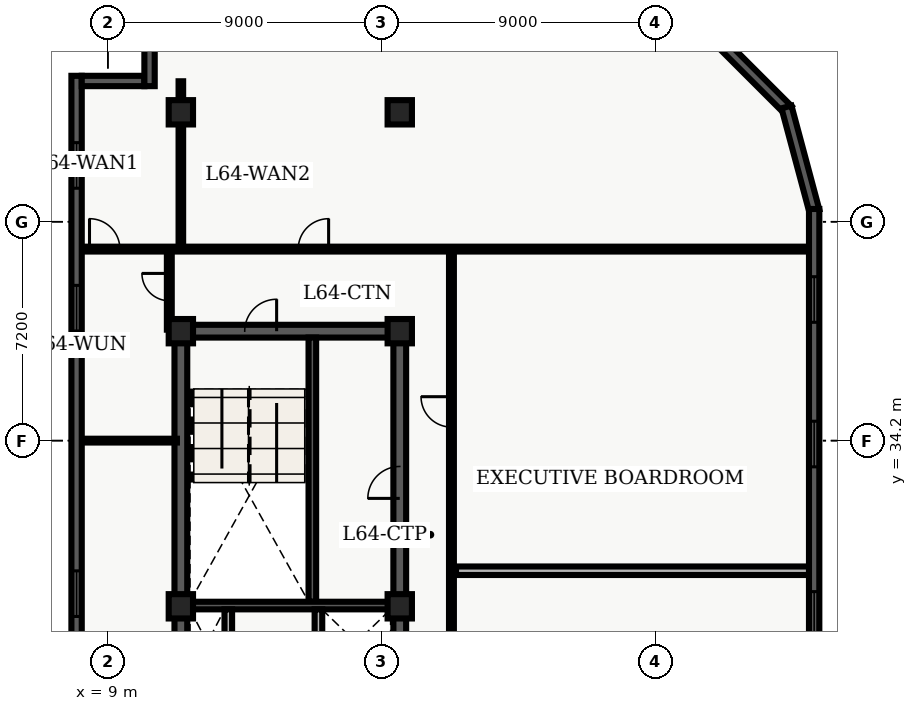
"""IFC4 building model, lengths in metres.
Left out: names, types, materials, properties, quantities, classifications, styles, units other than length and angle.
Written with IfcOpenShell. Run it as: python <this file> out.ifc"""

import sys

from ifc_helpers import new_model, entity, si_unit, converted_unit, direction, frame, origin_with_axes, origin_2d_with_axis, place, context, subcontext, project, spatial, polyline, rectangle, outline, extrude, element, fill, save


model = new_model("IFC4")
c1 = context("Model", 3, precision=1e-05, world=origin_with_axes(), true_north=direction((0.0, 1.0)))
c2 = subcontext(c1, "Body", "Model", "MODEL_VIEW")
j1 = project(units=[si_unit("LENGTHUNIT", "METRE"), converted_unit("PLANEANGLEUNIT", "DEGREE", entity("IfcPlaneAngleMeasure", 0.017), si_unit("PLANEANGLEUNIT", "RADIAN"), dimensions=[0, 0, 0, 0, 0, 0, 0])], contexts=[c1])
p1 = place(None, origin_with_axes())
s1 = spatial("IfcSite", under=j1, at=p1, CompositionType="ELEMENT")
p2 = place(p1, origin_with_axes())
s2 = spatial("IfcBuilding", under=s1, at=p2, CompositionType="ELEMENT")
p3 = place(p2, frame((0.0, 0.0, 260.7), z_axis=(0.0, 0.0, 1.0), x_axis=(1.0, 0.0, 0.0)))
s3 = spatial("IfcBuildingStorey", under=s2, at=p3, CompositionType="ELEMENT", Elevation=260.7)
p4 = place(p3, frame((11.4, 10.8, 0.0), z_axis=(0.0, 0.0, 1.0), x_axis=(0.0, 1.0, 0.0)))
e1 = element("IfcWall", 1, at=p4, inside=s3, PredefinedType="SHEAR", context=c2, shape_type="SweptSolid", body=[
    extrude(outline(polyline([(0.0, -0.21), (27.0, -0.21), (27.0, 0.21), (0.0, 0.21), (0.0, -0.21)])), origin_with_axes(), (0.0, 0.0, 1.0), 3.66),
])
p5 = place(p3, frame((11.4, 37.8, 0.0), z_axis=(0.0, 0.0, 1.0), x_axis=(1.0, 0.0, 0.0)))
e2 = element("IfcWall", 2, at=p5, inside=s3, PredefinedType="SHEAR", context=c2, shape_type="SweptSolid", body=[
    extrude(outline(polyline([(0.0, -0.21), (7.2, -0.21), (7.2, 0.21), (0.0, 0.21), (0.0, -0.21)])), origin_with_axes(), (0.0, 0.0, 1.0), 3.66),
])
p6 = place(p5, frame((2.625, 0.0, 0.0), z_axis=(0.0, 0.0, 1.0), x_axis=(1.0, 0.0, 0.0)))
e3 = element("IfcOpeningElement", 3, at=p6, cuts=e2, PredefinedType="OPENING", context=c2, shape_type="SweptSolid", body=[
    extrude(rectangle(XDim=1.05, YDim=0.44, at=origin_2d_with_axis()), origin_with_axes(), (0.0, 0.0, 1.0), 2.15),
])
p7 = place(p3, frame((18.6, 24.3, 0.0), z_axis=(0.0, 0.0, 1.0), x_axis=(0.0, 1.0, 0.0)))
e4 = element("IfcWall", 4, at=p7, inside=s3, PredefinedType="SHEAR", context=c2, shape_type="SweptSolid", body=[
    extrude(outline(polyline([(0.0, -0.21), (13.5, -0.21), (13.5, 0.21), (0.0, 0.21), (0.0, -0.21)])), origin_with_axes(), (0.0, 0.0, 1.0), 3.66),
])
p8 = place(p7, frame((8.525, 0.0, 0.0), z_axis=(0.0, 0.0, 1.0), x_axis=(1.0, 0.0, 0.0)))
e5 = element("IfcOpeningElement", 5, at=p8, cuts=e4, PredefinedType="OPENING", context=c2, shape_type="SweptSolid", body=[
    extrude(rectangle(XDim=1.05, YDim=0.44, at=origin_2d_with_axis()), origin_with_axes(), (0.0, 0.0, 1.0), 2.15),
])
p9 = place(p3, frame((15.725, 28.9, 0.0), z_axis=(0.0, 0.0, 1.0), x_axis=(0.0, 1.0, 0.0)))
e6 = element("IfcWall", 6, at=p9, inside=s3, PredefinedType="SHEAR", context=c2, shape_type="SweptSolid", body=[
    extrude(outline(polyline([(0.0, -0.125), (8.69, -0.125), (8.69, 0.125), (0.0, 0.125), (0.0, -0.125)])), origin_with_axes(), (0.0, 0.0, 1.0), 3.66),
])
p10 = place(p3, frame((11.61, 28.775, 0.0), z_axis=(0.0, 0.0, 1.0), x_axis=(1.0, 0.0, 0.0)))
e7 = element("IfcWall", 7, at=p10, inside=s3, PredefinedType="SHEAR", context=c2, shape_type="SweptSolid", body=[
    extrude(outline(polyline([(0.0, -0.125), (6.78, -0.125), (6.78, 0.125), (0.0, 0.125), (0.0, -0.125)])), origin_with_axes(), (0.0, 0.0, 1.0), 3.66),
])
for number, where, z_axis, x_axis in (
    (8, (12.96, 26.45, 0.0), (0.0, 0.0, 1.0), (0.0, 1.0, 0.0)),
    (9, (15.925, 26.45, 0.0), (0.0, 0.0, 1.0), (0.0, 1.0, 0.0)),
):
    element("IfcWall", number, at=place(p3, frame(where, z_axis=z_axis, x_axis=x_axis)), inside=s3, PredefinedType="SOLIDWALL", context=c2, shape_type="SweptSolid", body=[
        extrude(outline(polyline([(0.0, -0.125), (2.2, -0.125), (2.2, 0.125), (0.0, 0.125), (0.0, -0.125)])), origin_with_axes(), (0.0, 0.0, 1.0), 2.7),
    ])
for number, where, z_axis, x_axis in (
    (10, (11.4, 28.75, 0.0), (0.0, 0.0, 1.0), (1.0, 0.0, 0.0)),
    (11, (11.4, 37.8, 0.0), (0.0, 0.0, 1.0), (1.0, 0.0, 0.0)),
    (12, (11.4, 45.0, 0.0), (0.0, 0.0, 1.0), (1.0, 0.0, 0.0)),
    (13, (18.6, 28.75, 0.0), (0.0, 0.0, 1.0), (1.0, 0.0, 0.0)),
    (14, (18.6, 37.8, 0.0), (0.0, 0.0, 1.0), (1.0, 0.0, 0.0)),
    (15, (18.6, 45.0, 0.0), (0.0, 0.0, 1.0), (1.0, 0.0, 0.0)),
):
    element("IfcColumn", number, at=place(p3, frame(where, z_axis=z_axis, x_axis=x_axis)), inside=s3, PredefinedType="COLUMN", context=c2, shape_type="SweptSolid", body=[
        extrude(rectangle(XDim=0.8, YDim=0.8, at=origin_2d_with_axis()), origin_with_axes(), (0.0, 0.0, 1.0), 3.9),
    ])
p11 = place(p3, frame((8.135, 40.5, 0.0), z_axis=(0.0, 0.0, 1.0), x_axis=(1.0, 0.0, 0.0)))
e16 = element("IfcWall", 16, at=p11, inside=s3, PredefinedType="PARTITIONING", context=c2, shape_type="SweptSolid", body=[
    extrude(outline(polyline([(0.0, -0.08), (23.93, -0.08), (23.93, 0.08), (0.0, 0.08), (0.0, -0.08)])), origin_with_axes(), (0.0, 0.0, 1.0), 2.7),
])
p12 = place(p11, frame((0.76, 0.0, 0.0), z_axis=(0.0, 0.0, 1.0), x_axis=(1.0, 0.0, 0.0)))
e17 = element("IfcOpeningElement", 17, at=p12, cuts=e16, PredefinedType="OPENING", context=c2, shape_type="SweptSolid", body=[
    extrude(rectangle(XDim=1.0, YDim=0.18, at=origin_2d_with_axis()), origin_with_axes(), (0.0, 0.0, 1.0), 2.15),
])
p13 = place(p11, frame((7.625, 0.0, 0.0), z_axis=(0.0, 0.0, 1.0), x_axis=(1.0, 0.0, 0.0)))
e18 = element("IfcOpeningElement", 18, at=p13, cuts=e16, PredefinedType="OPENING", context=c2, shape_type="SweptSolid", body=[
    extrude(rectangle(XDim=1.0, YDim=0.18, at=origin_2d_with_axis()), origin_with_axes(), (0.0, 0.0, 1.0), 2.15),
])
p14 = place(p3, frame((20.3, 7.8, 0.0), z_axis=(0.0, 0.0, 1.0), x_axis=(0.0, 1.0, 0.0)))
e19 = element("IfcWall", 19, at=p14, inside=s3, PredefinedType="PARTITIONING", context=c2, shape_type="SweptSolid", body=[
    extrude(outline(polyline([(0.0, -0.08), (32.7, -0.08), (32.7, 0.08), (0.0, 0.08), (0.0, -0.08)])), origin_with_axes(), (0.0, 0.0, 1.0), 2.7),
])
p15 = place(p14, frame((17.825, 0.0, 0.0), z_axis=(0.0, 0.0, 1.0), x_axis=(1.0, 0.0, 0.0)))
e20 = element("IfcOpeningElement", 20, at=p15, cuts=e19, PredefinedType="OPENING", context=c2, shape_type="SweptSolid", body=[
    extrude(rectangle(XDim=1.0, YDim=0.18, at=origin_2d_with_axis()), origin_with_axes(), (0.0, 0.0, 1.0), 2.15),
])
p16 = place(p14, frame((27.345, 0.0, 0.0), z_axis=(0.0, 0.0, 1.0), x_axis=(1.0, 0.0, 0.0)))
e21 = element("IfcOpeningElement", 21, at=p16, cuts=e19, PredefinedType="OPENING", context=c2, shape_type="SweptSolid", body=[
    extrude(rectangle(XDim=1.0, YDim=0.18, at=origin_2d_with_axis()), origin_with_axes(), (0.0, 0.0, 1.0), 2.15),
])
p17 = place(p14, frame((5.775, 0.0, 0.0), z_axis=(0.0, 0.0, 1.0), x_axis=(1.0, 0.0, 0.0)))
e22 = element("IfcOpeningElement", 22, at=p17, cuts=e19, PredefinedType="OPENING", context=c2, shape_type="SweptSolid", body=[
    extrude(rectangle(XDim=1.05, YDim=0.18, at=origin_2d_with_axis()), origin_with_axes(), (0.0, 0.0, 1.0), 2.15),
])
p18 = place(p3, frame((11.02, 37.85, 0.0), z_axis=(0.0, 0.0, 1.0), x_axis=(0.0, 1.0, 0.0)))
e23 = element("IfcWall", 23, at=p18, inside=s3, PredefinedType="PARTITIONING", context=c2, shape_type="SweptSolid", body=[
    extrude(outline(polyline([(0.0, -0.08), (2.65, -0.08), (2.65, 0.08), (0.0, 0.08), (0.0, -0.08)])), origin_with_axes(), (0.0, 0.0, 1.0), 2.7),
])
p19 = place(p18, frame((1.4, 0.0, 0.0), z_axis=(0.0, 0.0, 1.0), x_axis=(1.0, 0.0, 0.0)))
e24 = element("IfcOpeningElement", 24, at=p19, cuts=e23, PredefinedType="OPENING", context=c2, shape_type="SweptSolid", body=[
    extrude(rectangle(XDim=0.9, YDim=0.18, at=origin_2d_with_axis()), origin_with_axes(), (0.0, 0.0, 1.0), 2.15),
])
p20 = place(p3, frame((8.135, 34.2, 0.0), z_axis=(0.0, 0.0, 1.0), x_axis=(1.0, 0.0, 0.0)))
e25 = element("IfcWall", 25, at=p20, inside=s3, PredefinedType="PARTITIONING", context=c2, shape_type="SweptSolid", body=[
    extrude(outline(polyline([(0.0, -0.062), (3.135, -0.062), (3.135, 0.062), (0.0, 0.062), (0.0, -0.062)])), origin_with_axes(), (0.0, 0.0, 1.0), 2.7),
])
p21 = place(p3, frame((11.4, 40.6, 0.0), z_axis=(0.0, 0.0, 1.0), x_axis=(0.0, 1.0, 0.0)))
e26 = element("IfcWall", 26, at=p21, inside=s3, PredefinedType="PARTITIONING", context=c2, shape_type="SweptSolid", body=[
    extrude(outline(polyline([(0.0, -0.075), (5.42, -0.075), (5.42, 0.075), (0.0, 0.075), (0.0, -0.075)])), origin_with_axes(), (0.0, 0.0, 1.0), 2.7),
])
p22 = place(p3, frame((20.45, 29.92, 0.0), z_axis=(0.0, 0.0, 1.0), x_axis=(1.0, 0.0, 0.0)))
e27 = element("IfcWall", 27, at=p22, inside=s3, PredefinedType="PARTITIONING", context=c2, shape_type="SweptSolid", body=[
    extrude(outline(polyline([(0.0, -0.14), (11.615, -0.14), (11.615, 0.14), (0.0, 0.14), (0.0, -0.14)])), origin_with_axes(), (0.0, 0.0, 1.0), 2.7),
])
p23 = place(p3, frame((7.97, 2.74, 0.0), z_axis=(0.0, 0.0, 1.0), x_axis=(0.0, 1.0, 0.0)))
e28 = element("IfcWall", 28, at=p23, inside=s3, PredefinedType="SOLIDWALL", context=c2, shape_type="SweptSolid", body=[
    extrude(outline(polyline([(0.0, -0.17), (43.46, -0.17), (43.46, 0.17), (0.0, 0.17), (0.0, -0.17)])), origin_with_axes(), (0.0, 0.0, 1.0), 3.66),
])
p24 = place(p23, frame((2.948, 0.0, 0.45), z_axis=(0.0, 0.0, 1.0), x_axis=(1.0, 0.0, 0.0)))
e29 = element("IfcOpeningElement", 29, at=p24, cuts=e28, PredefinedType="OPENING", context=c2, shape_type="SweptSolid", body=[
    extrude(rectangle(XDim=1.5, YDim=0.36, at=origin_2d_with_axis()), origin_with_axes(), (0.0, 0.0, 1.0), 2.1),
])
p25 = place(p23, frame((7.643, 0.0, 0.45), z_axis=(0.0, 0.0, 1.0), x_axis=(1.0, 0.0, 0.0)))
e30 = element("IfcOpeningElement", 30, at=p25, cuts=e28, PredefinedType="OPENING", context=c2, shape_type="SweptSolid", body=[
    extrude(rectangle(XDim=1.5, YDim=0.36, at=origin_2d_with_axis()), origin_with_axes(), (0.0, 0.0, 1.0), 2.1),
])
p26 = place(p23, frame((13.189, 0.0, 0.45), z_axis=(0.0, 0.0, 1.0), x_axis=(1.0, 0.0, 0.0)))
e31 = element("IfcOpeningElement", 31, at=p26, cuts=e28, PredefinedType="OPENING", context=c2, shape_type="SweptSolid", body=[
    extrude(rectangle(XDim=1.5, YDim=0.36, at=origin_2d_with_axis()), origin_with_axes(), (0.0, 0.0, 1.0), 2.1),
])
p27 = place(p23, frame((17.034, 0.0, 0.45), z_axis=(0.0, 0.0, 1.0), x_axis=(1.0, 0.0, 0.0)))
e32 = element("IfcOpeningElement", 32, at=p27, cuts=e28, PredefinedType="OPENING", context=c2, shape_type="SweptSolid", body=[
    extrude(rectangle(XDim=1.5, YDim=0.36, at=origin_2d_with_axis()), origin_with_axes(), (0.0, 0.0, 1.0), 2.1),
])
p28 = place(p23, frame((21.73, 0.0, 0.45), z_axis=(0.0, 0.0, 1.0), x_axis=(1.0, 0.0, 0.0)))
e33 = element("IfcOpeningElement", 33, at=p28, cuts=e28, PredefinedType="OPENING", context=c2, shape_type="SweptSolid", body=[
    extrude(rectangle(XDim=1.5, YDim=0.36, at=origin_2d_with_axis()), origin_with_axes(), (0.0, 0.0, 1.0), 2.1),
])
p29 = place(p23, frame((26.426, 0.0, 0.45), z_axis=(0.0, 0.0, 1.0), x_axis=(1.0, 0.0, 0.0)))
e34 = element("IfcOpeningElement", 34, at=p29, cuts=e28, PredefinedType="OPENING", context=c2, shape_type="SweptSolid", body=[
    extrude(rectangle(XDim=1.5, YDim=0.36, at=origin_2d_with_axis()), origin_with_axes(), (0.0, 0.0, 1.0), 2.1),
])
p30 = place(p23, frame((35.817, 0.0, 0.45), z_axis=(0.0, 0.0, 1.0), x_axis=(1.0, 0.0, 0.0)))
e35 = element("IfcOpeningElement", 35, at=p30, cuts=e28, PredefinedType="OPENING", context=c2, shape_type="SweptSolid", body=[
    extrude(rectangle(XDim=1.5, YDim=0.36, at=origin_2d_with_axis()), origin_with_axes(), (0.0, 0.0, 1.0), 2.1),
])
p31 = place(p23, frame((40.512, 0.0, 0.45), z_axis=(0.0, 0.0, 1.0), x_axis=(1.0, 0.0, 0.0)))
e36 = element("IfcOpeningElement", 36, at=p31, cuts=e28, PredefinedType="OPENING", context=c2, shape_type="SweptSolid", body=[
    extrude(rectangle(XDim=1.5, YDim=0.36, at=origin_2d_with_axis()), origin_with_axes(), (0.0, 0.0, 1.0), 2.1),
])
p32 = place(p3, frame((8.14, 46.03, 0.0), z_axis=(0.0, 0.0, 1.0), x_axis=(1.0, 0.0, 0.0)))
e37 = element("IfcWall", 37, at=p32, inside=s3, PredefinedType="SOLIDWALL", context=c2, shape_type="SweptSolid", body=[
    extrude(outline(polyline([(0.0, -0.17), (2.06, -0.17), (2.06, 0.17), (0.0, 0.17), (0.0, -0.17)])), origin_with_axes(), (0.0, 0.0, 1.0), 3.66),
])
p33 = place(p3, frame((10.37, 45.86, 0.0), z_axis=(0.0, 0.0, 1.0), x_axis=(0.0, 1.0, 0.0)))
e38 = element("IfcWall", 38, at=p33, inside=s3, PredefinedType="SOLIDWALL", context=c2, shape_type="SweptSolid", body=[
    extrude(outline(polyline([(0.0, -0.17), (2.74, -0.17), (2.74, 0.17), (0.0, 0.17), (0.0, -0.17)])), origin_with_axes(), (0.0, 0.0, 1.0), 3.66),
])
p34 = place(p3, frame((28.866, 47.583, 0.0), z_axis=(0.0, 0.0, 1.0), x_axis=(0.707107, -0.707107, 0.0)))
e39 = element("IfcWall", 39, at=p34, inside=s3, PredefinedType="SOLIDWALL", context=c2, shape_type="SweptSolid", body=[
    extrude(outline(polyline([(0.0, -0.17), (3.54, -0.17), (3.54, 0.17), (0.0, 0.17), (0.0, -0.17)])), origin_with_axes(), (0.0, 0.0, 1.0), 3.66),
])
p35 = place(p3, frame((31.32, 45.175, 0.0), z_axis=(0.0, 0.0, 1.0), x_axis=(0.258788, -0.965934, 0.0)))
e40 = element("IfcWall", 40, at=p35, inside=s3, PredefinedType="SOLIDWALL", context=c2, shape_type="SweptSolid", body=[
    extrude(outline(polyline([(0.0, -0.17), (3.54, -0.17), (3.54, 0.17), (0.0, 0.17), (0.0, -0.17)])), origin_with_axes(), (0.0, 0.0, 1.0), 3.66),
])
p36 = place(p3, frame((32.23, 41.82, 0.0), z_axis=(0.0, 0.0, 1.0), x_axis=(0.0, -1.0, 0.0)))
e41 = element("IfcWall", 41, at=p36, inside=s3, PredefinedType="SOLIDWALL", context=c2, shape_type="SweptSolid", body=[
    extrude(outline(polyline([(0.0, -0.17), (20.22, -0.17), (20.22, 0.17), (0.0, 0.17), (0.0, -0.17)])), origin_with_axes(), (0.0, 0.0, 1.0), 3.66),
])
p37 = place(p36, frame((2.978, 0.0, 0.45), z_axis=(0.0, 0.0, 1.0), x_axis=(1.0, 0.0, 0.0)))
e42 = element("IfcOpeningElement", 42, at=p37, cuts=e41, PredefinedType="OPENING", context=c2, shape_type="SweptSolid", body=[
    extrude(rectangle(XDim=1.5, YDim=0.36, at=origin_2d_with_axis()), origin_with_axes(), (0.0, 0.0, 1.0), 2.1),
])
p38 = place(p36, frame((7.732, 0.0, 0.45), z_axis=(0.0, 0.0, 1.0), x_axis=(1.0, 0.0, 0.0)))
e43 = element("IfcOpeningElement", 43, at=p38, cuts=e41, PredefinedType="OPENING", context=c2, shape_type="SweptSolid", body=[
    extrude(rectangle(XDim=1.5, YDim=0.36, at=origin_2d_with_axis()), origin_with_axes(), (0.0, 0.0, 1.0), 2.1),
])
p39 = place(p36, frame((13.337, 0.0, 0.45), z_axis=(0.0, 0.0, 1.0), x_axis=(1.0, 0.0, 0.0)))
e44 = element("IfcOpeningElement", 44, at=p39, cuts=e41, PredefinedType="OPENING", context=c2, shape_type="SweptSolid", body=[
    extrude(rectangle(XDim=1.5, YDim=0.36, at=origin_2d_with_axis()), origin_with_axes(), (0.0, 0.0, 1.0), 2.1),
])
p40 = place(p36, frame((17.242, 0.0, 0.45), z_axis=(0.0, 0.0, 1.0), x_axis=(1.0, 0.0, 0.0)))
e45 = element("IfcOpeningElement", 45, at=p40, cuts=e41, PredefinedType="OPENING", context=c2, shape_type="SweptSolid", body=[
    extrude(rectangle(XDim=1.5, YDim=0.36, at=origin_2d_with_axis()), origin_with_axes(), (0.0, 0.0, 1.0), 2.1),
])
p41 = place(p5, frame((2.625, 0.0, 0.0), z_axis=(0.0, 0.0, 1.0), x_axis=(1.0, 0.0, 0.0)))
e46 = element("IfcDoor", 46, at=p41, inside=s3, OperationType="SINGLE_SWING_RIGHT", PredefinedType="DOOR", context=c2, shape_type="SweptSolid", body=[
    extrude(rectangle(XDim=1.05, YDim=0.09, at=origin_2d_with_axis()), origin_with_axes(), (0.0, 0.0, 1.0), 2.15),
])
fill(e3, e46)
p42 = place(p7, frame((8.525, 0.0, 0.0), z_axis=(0.0, 0.0, 1.0), x_axis=(1.0, 0.0, 0.0)))
e47 = element("IfcDoor", 47, at=p42, inside=s3, OperationType="SINGLE_SWING_LEFT", PredefinedType="DOOR", context=c2, shape_type="SweptSolid", body=[
    extrude(rectangle(XDim=1.05, YDim=0.09, at=origin_2d_with_axis()), origin_with_axes(), (0.0, 0.0, 1.0), 2.15),
])
fill(e5, e47)
p43 = place(p18, frame((1.4, 0.0, 0.0), z_axis=(0.0, 0.0, 1.0), x_axis=(1.0, 0.0, 0.0)))
e48 = element("IfcDoor", 48, at=p43, inside=s3, OperationType="SINGLE_SWING_RIGHT", PredefinedType="DOOR", context=c2, shape_type="SweptSolid", body=[
    extrude(rectangle(XDim=0.9, YDim=0.09, at=origin_2d_with_axis()), origin_with_axes(), (0.0, 0.0, 1.0), 2.15),
])
fill(e24, e48)
p44 = place(p11, frame((0.76, 0.0, 0.0), z_axis=(0.0, 0.0, 1.0), x_axis=(1.0, 0.0, 0.0)))
e49 = element("IfcDoor", 49, at=p44, inside=s3, OperationType="SINGLE_SWING_LEFT", PredefinedType="DOOR", context=c2, shape_type="SweptSolid", body=[
    extrude(rectangle(XDim=1.0, YDim=0.09, at=origin_2d_with_axis()), origin_with_axes(), (0.0, 0.0, 1.0), 2.15),
])
fill(e17, e49)
p45 = place(p11, frame((7.625, 0.0, 0.0), z_axis=(0.0, 0.0, 1.0), x_axis=(1.0, 0.0, 0.0)))
e50 = element("IfcDoor", 50, at=p45, inside=s3, OperationType="SINGLE_SWING_RIGHT", PredefinedType="DOOR", context=c2, shape_type="SweptSolid", body=[
    extrude(rectangle(XDim=1.0, YDim=0.09, at=origin_2d_with_axis()), origin_with_axes(), (0.0, 0.0, 1.0), 2.15),
])
fill(e18, e50)
p46 = place(p14, frame((27.345, 0.0, 0.0), z_axis=(0.0, 0.0, 1.0), x_axis=(1.0, 0.0, 0.0)))
e51 = element("IfcDoor", 51, at=p46, inside=s3, OperationType="SINGLE_SWING_RIGHT", PredefinedType="DOOR", context=c2, shape_type="SweptSolid", body=[
    extrude(rectangle(XDim=1.0, YDim=0.09, at=origin_2d_with_axis()), origin_with_axes(), (0.0, 0.0, 1.0), 2.15),
])
fill(e21, e51)
p47 = place(p23, frame((26.426, 0.0, 0.45), z_axis=(0.0, 0.0, 1.0), x_axis=(1.0, 0.0, 0.0)))
e52 = element("IfcWindow", 52, at=p47, inside=s3, PredefinedType="WINDOW", context=c2, shape_type="SweptSolid", body=[
    extrude(rectangle(XDim=1.5, YDim=0.09, at=origin_2d_with_axis()), origin_with_axes(), (0.0, 0.0, 1.0), 2.1),
])
fill(e34, e52)
p48 = place(p23, frame((35.817, 0.0, 0.45), z_axis=(0.0, 0.0, 1.0), x_axis=(1.0, 0.0, 0.0)))
e53 = element("IfcWindow", 53, at=p48, inside=s3, PredefinedType="WINDOW", context=c2, shape_type="SweptSolid", body=[
    extrude(rectangle(XDim=1.5, YDim=0.09, at=origin_2d_with_axis()), origin_with_axes(), (0.0, 0.0, 1.0), 2.1),
])
fill(e35, e53)
p49 = place(p23, frame((40.512, 0.0, 0.45), z_axis=(0.0, 0.0, 1.0), x_axis=(1.0, 0.0, 0.0)))
e54 = element("IfcWindow", 54, at=p49, inside=s3, PredefinedType="WINDOW", context=c2, shape_type="SweptSolid", body=[
    extrude(rectangle(XDim=1.5, YDim=0.09, at=origin_2d_with_axis()), origin_with_axes(), (0.0, 0.0, 1.0), 2.1),
])
fill(e36, e54)
p50 = place(p36, frame((2.978, 0.0, 0.45), z_axis=(0.0, 0.0, 1.0), x_axis=(1.0, 0.0, 0.0)))
e55 = element("IfcWindow", 55, at=p50, inside=s3, PredefinedType="WINDOW", context=c2, shape_type="SweptSolid", body=[
    extrude(rectangle(XDim=1.5, YDim=0.09, at=origin_2d_with_axis()), origin_with_axes(), (0.0, 0.0, 1.0), 2.1),
])
fill(e42, e55)
p51 = place(p36, frame((7.732, 0.0, 0.45), z_axis=(0.0, 0.0, 1.0), x_axis=(1.0, 0.0, 0.0)))
e56 = element("IfcWindow", 56, at=p51, inside=s3, PredefinedType="WINDOW", context=c2, shape_type="SweptSolid", body=[
    extrude(rectangle(XDim=1.5, YDim=0.09, at=origin_2d_with_axis()), origin_with_axes(), (0.0, 0.0, 1.0), 2.1),
])
fill(e43, e56)
p52 = place(p36, frame((13.337, 0.0, 0.45), z_axis=(0.0, 0.0, 1.0), x_axis=(1.0, 0.0, 0.0)))
e57 = element("IfcWindow", 57, at=p52, inside=s3, PredefinedType="WINDOW", context=c2, shape_type="SweptSolid", body=[
    extrude(rectangle(XDim=1.5, YDim=0.09, at=origin_2d_with_axis()), origin_with_axes(), (0.0, 0.0, 1.0), 2.1),
])
fill(e44, e57)
save(model, sys.argv[1])
